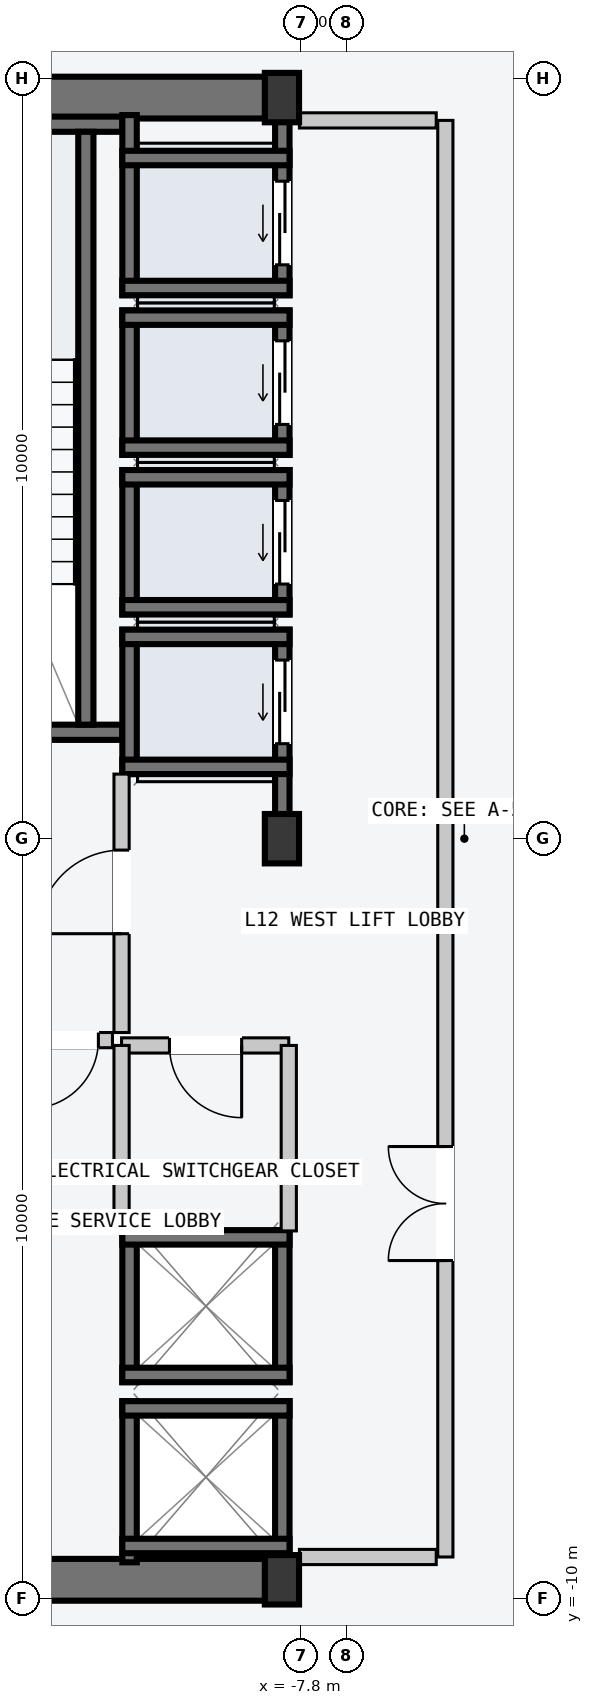
"""IFC4 building model, lengths in metres.
Left out: names, types, materials, properties, quantities, classifications, styles, units other than length and angle.
Written with IfcOpenShell. Run it as: python <this file> out.ifc"""

import sys

from ifc_helpers import new_model, si_unit, direction, frame, frame_2d, origin, origin_2d, place, context, subcontext, project, spatial, rectangle, i_section, extrude, element, fill, save


model = new_model("IFC4")
c1 = context("Model", 3, precision=1e-05, world=origin(), true_north=direction((0.0, 1.0)))
c2 = subcontext(c1, "Body", "Model", "MODEL_VIEW")
j1 = project(units=[si_unit("LENGTHUNIT", "METRE"), si_unit("PLANEANGLEUNIT", "RADIAN")], contexts=[c1])
p1 = place(None, origin())
s1 = spatial("IfcSite", under=j1, at=p1, CompositionType="ELEMENT")
p2 = place(p1, origin())
s2 = spatial("IfcBuilding", under=s1, at=p2, CompositionType="ELEMENT")
p3 = place(p2, frame((0.0, 0.0, 49.2)))
s3 = spatial("IfcBuildingStorey", under=s2, at=p3, CompositionType="ELEMENT", Elevation=49.2)
for number, where, z_axis, x_axis in (
    (1, (-14.53, -9.75, -0.2), (0.0, 0.0, 1.0), (1.0, 0.0, 0.0)),
    (2, (-14.53, 9.75, -0.2), (0.0, 0.0, 1.0), (1.0, 0.0, 0.0)),
):
    element("IfcWall", number, at=place(p3, frame(where, z_axis=z_axis, x_axis=x_axis)), inside=s3, PredefinedType="SHEAR", context=c2, shape_type="SweptSolid", body=[
        extrude(rectangle(XDim=6.46, YDim=0.55, at=frame_2d((3.23, 0.0))), origin(), (0.0, 0.0, 1.0), 3.6),
    ])
p4 = place(p3, frame((-14.25, 1.4, -0.2), z_axis=(0.0, 0.0, 1.0), x_axis=(1.0, 0.0, 0.0)))
e3 = element("IfcWall", 3, at=p4, inside=s3, PredefinedType="SOLIDWALL", context=c2, shape_type="SweptSolid", body=[
    extrude(rectangle(XDim=4.1, YDim=0.2, at=frame_2d((2.05, 0.0))), origin(), (0.0, 0.0, 1.0), 3.6),
])
p5 = place(p4, frame((1.5, 0.0, 0.2)))
e4 = element("IfcOpeningElement", 4, at=p5, cuts=e3, PredefinedType="OPENING", context=c2, shape_type="SweptSolid", body=[
    extrude(rectangle(XDim=1.12, YDim=2.18, at=frame_2d((0.56, 1.09))), frame((0.0, 0.11, 0.0), z_axis=(0.0, -1.0, 0.0), x_axis=(1.0, 0.0, 0.0)), (0.0, 0.0, 1.0), 0.22),
])
p6 = place(p3, frame((-14.25, 9.4, -0.2), z_axis=(0.0, 0.0, 1.0), x_axis=(1.0, 0.0, 0.0)))
e5 = element("IfcWall", 5, at=p6, inside=s3, PredefinedType="SOLIDWALL", context=c2, shape_type="SweptSolid", body=[
    extrude(rectangle(XDim=4.1, YDim=0.2, at=frame_2d((2.05, 0.0))), origin(), (0.0, 0.0, 1.0), 3.6),
])
p7 = place(p3, frame((-10.63, 1.5, -0.2), z_axis=(0.0, 0.0, 1.0), x_axis=(0.0, 1.0, 0.0)))
e6 = element("IfcWall", 6, at=p7, inside=s3, PredefinedType="SOLIDWALL", context=c2, shape_type="SweptSolid", body=[
    extrude(rectangle(XDim=7.8, YDim=0.2, at=frame_2d((3.9, 0.0))), origin(), (0.0, 0.0, 1.0), 3.6),
])
for number, where, z_axis, x_axis in (
    (7, (-8.05, -9.75, 0.0), (0.0, 0.0, 1.0), (1.0, 0.0, 0.0)),
    (8, (-8.05, 0.0, 0.0), (0.0, 0.0, 1.0), (1.0, 0.0, 0.0)),
    (9, (-8.05, 9.75, 0.0), (0.0, 0.0, 1.0), (1.0, 0.0, 0.0)),
):
    element("IfcColumn", number, at=place(p3, frame(where, z_axis=z_axis, x_axis=x_axis)), inside=s3, PredefinedType="COLUMN", context=c2, shape_type="SweptSolid", body=[
        extrude(i_section(OverallWidth=0.45, OverallDepth=0.65, WebThickness=0.025, FlangeThickness=0.04, at=origin_2d()), origin(), (0.0, 0.0, 1.0), 3.6),
    ])
p8 = place(p3, frame((-8.045, 0.21, -0.2), z_axis=(0.0, 0.0, 1.0), x_axis=(0.0, 1.0, 0.0)))
e10 = element("IfcWall", 10, at=p8, inside=s3, PredefinedType="SOLIDWALL", context=c2, shape_type="SweptSolid", body=[
    extrude(rectangle(XDim=2.54, YDim=0.19, at=frame_2d((1.27, 0.0))), origin(), (0.0, 0.0, 1.0), 3.6),
])
p9 = place(p8, frame((1.04, 0.0, 0.2)))
e11 = element("IfcOpeningElement", 11, at=p9, cuts=e10, PredefinedType="OPENING", context=c2, shape_type="SweptSolid", body=[
    extrude(rectangle(XDim=1.1, YDim=2.2, at=frame_2d((0.55, 1.1))), frame((0.0, 0.105, 0.0), z_axis=(0.0, -1.0, 0.0), x_axis=(1.0, 0.0, 0.0)), (0.0, 0.0, 1.0), 0.21),
])
p10 = place(p3, frame((-10.055, 0.85, -0.2), z_axis=(0.0, 0.0, 1.0), x_axis=(0.0, 1.0, 0.0)))
e12 = element("IfcWall", 12, at=p10, inside=s3, PredefinedType="SOLIDWALL", context=c2, shape_type="SweptSolid", body=[
    extrude(rectangle(XDim=1.9, YDim=0.19, at=frame_2d((0.95, 0.0))), origin(), (0.0, 0.0, 1.0), 3.6),
])
for number, where, z_axis, x_axis in (
    (13, (-10.15, 2.655, -0.2), (0.0, 0.0, 1.0), (1.0, 0.0, 0.0)),
    (14, (-10.15, 0.945, -0.2), (0.0, 0.0, 1.0), (1.0, 0.0, 0.0)),
):
    element("IfcWall", number, at=place(p3, frame(where, z_axis=z_axis, x_axis=x_axis)), inside=s3, PredefinedType="SOLIDWALL", context=c2, shape_type="SweptSolid", body=[
        extrude(rectangle(XDim=2.2, YDim=0.19, at=frame_2d((1.1, 0.0))), origin(), (0.0, 0.0, 1.0), 3.6),
    ])
p11 = place(p3, frame((-8.045, 2.95, -0.2), z_axis=(0.0, 0.0, 1.0), x_axis=(0.0, 1.0, 0.0)))
e15 = element("IfcWall", 15, at=p11, inside=s3, PredefinedType="SOLIDWALL", context=c2, shape_type="SweptSolid", body=[
    extrude(rectangle(XDim=1.9, YDim=0.19, at=frame_2d((0.95, 0.0))), origin(), (0.0, 0.0, 1.0), 3.6),
])
p12 = place(p11, frame((0.4, 0.0, 0.2)))
e16 = element("IfcOpeningElement", 16, at=p12, cuts=e15, PredefinedType="OPENING", context=c2, shape_type="SweptSolid", body=[
    extrude(rectangle(XDim=1.1, YDim=2.2, at=frame_2d((0.55, 1.1))), frame((0.0, 0.105, 0.0), z_axis=(0.0, -1.0, 0.0), x_axis=(1.0, 0.0, 0.0)), (0.0, 0.0, 1.0), 0.21),
])
p13 = place(p3, frame((-10.055, 2.95, -0.2), z_axis=(0.0, 0.0, 1.0), x_axis=(0.0, 1.0, 0.0)))
e17 = element("IfcWall", 17, at=p13, inside=s3, PredefinedType="SOLIDWALL", context=c2, shape_type="SweptSolid", body=[
    extrude(rectangle(XDim=1.9, YDim=0.19, at=frame_2d((0.95, 0.0))), origin(), (0.0, 0.0, 1.0), 3.6),
])
for number, where, z_axis, x_axis in (
    (18, (-10.15, 4.755, -0.2), (0.0, 0.0, 1.0), (1.0, 0.0, 0.0)),
    (19, (-10.15, 3.045, -0.2), (0.0, 0.0, 1.0), (1.0, 0.0, 0.0)),
):
    element("IfcWall", number, at=place(p3, frame(where, z_axis=z_axis, x_axis=x_axis)), inside=s3, PredefinedType="SOLIDWALL", context=c2, shape_type="SweptSolid", body=[
        extrude(rectangle(XDim=2.2, YDim=0.19, at=frame_2d((1.1, 0.0))), origin(), (0.0, 0.0, 1.0), 3.6),
    ])
p14 = place(p3, frame((-8.045, 5.05, -0.2), z_axis=(0.0, 0.0, 1.0), x_axis=(0.0, 1.0, 0.0)))
e20 = element("IfcWall", 20, at=p14, inside=s3, PredefinedType="SOLIDWALL", context=c2, shape_type="SweptSolid", body=[
    extrude(rectangle(XDim=1.9, YDim=0.19, at=frame_2d((0.95, 0.0))), origin(), (0.0, 0.0, 1.0), 3.6),
])
p15 = place(p14, frame((0.4, 0.0, 0.2)))
e21 = element("IfcOpeningElement", 21, at=p15, cuts=e20, PredefinedType="OPENING", context=c2, shape_type="SweptSolid", body=[
    extrude(rectangle(XDim=1.1, YDim=2.2, at=frame_2d((0.55, 1.1))), frame((0.0, 0.105, 0.0), z_axis=(0.0, -1.0, 0.0), x_axis=(1.0, 0.0, 0.0)), (0.0, 0.0, 1.0), 0.21),
])
p16 = place(p3, frame((-10.055, 5.05, -0.2), z_axis=(0.0, 0.0, 1.0), x_axis=(0.0, 1.0, 0.0)))
e22 = element("IfcWall", 22, at=p16, inside=s3, PredefinedType="SOLIDWALL", context=c2, shape_type="SweptSolid", body=[
    extrude(rectangle(XDim=1.9, YDim=0.19, at=frame_2d((0.95, 0.0))), origin(), (0.0, 0.0, 1.0), 3.6),
])
for number, where, z_axis, x_axis in (
    (23, (-10.15, 6.855, -0.2), (0.0, 0.0, 1.0), (1.0, 0.0, 0.0)),
    (24, (-10.15, 5.145, -0.2), (0.0, 0.0, 1.0), (1.0, 0.0, 0.0)),
):
    element("IfcWall", number, at=place(p3, frame(where, z_axis=z_axis, x_axis=x_axis)), inside=s3, PredefinedType="SOLIDWALL", context=c2, shape_type="SweptSolid", body=[
        extrude(rectangle(XDim=2.2, YDim=0.19, at=frame_2d((1.1, 0.0))), origin(), (0.0, 0.0, 1.0), 3.6),
    ])
p17 = place(p3, frame((-8.045, 7.15, -0.2), z_axis=(0.0, 0.0, 1.0), x_axis=(0.0, 1.0, 0.0)))
e25 = element("IfcWall", 25, at=p17, inside=s3, PredefinedType="SOLIDWALL", context=c2, shape_type="SweptSolid", body=[
    extrude(rectangle(XDim=2.37, YDim=0.19, at=frame_2d((1.185, 0.0))), origin(), (0.0, 0.0, 1.0), 3.6),
])
p18 = place(p17, frame((0.4, 0.0, 0.2)))
e26 = element("IfcOpeningElement", 26, at=p18, cuts=e25, PredefinedType="OPENING", context=c2, shape_type="SweptSolid", body=[
    extrude(rectangle(XDim=1.1, YDim=2.2, at=frame_2d((0.55, 1.1))), frame((0.0, 0.105, 0.0), z_axis=(0.0, -1.0, 0.0), x_axis=(1.0, 0.0, 0.0)), (0.0, 0.0, 1.0), 0.21),
])
p19 = place(p3, frame((-10.055, 7.15, -0.2), z_axis=(0.0, 0.0, 1.0), x_axis=(0.0, 1.0, 0.0)))
e27 = element("IfcWall", 27, at=p19, inside=s3, PredefinedType="SOLIDWALL", context=c2, shape_type="SweptSolid", body=[
    extrude(rectangle(XDim=2.37, YDim=0.19, at=frame_2d((1.185, 0.0))), origin(), (0.0, 0.0, 1.0), 3.6),
])
for number, where, z_axis, x_axis in (
    (28, (-10.15, 8.955, -0.2), (0.0, 0.0, 1.0), (1.0, 0.0, 0.0)),
    (29, (-10.15, 7.245, -0.2), (0.0, 0.0, 1.0), (1.0, 0.0, 0.0)),
):
    element("IfcWall", number, at=place(p3, frame(where, z_axis=z_axis, x_axis=x_axis)), inside=s3, PredefinedType="SOLIDWALL", context=c2, shape_type="SweptSolid", body=[
        extrude(rectangle(XDim=2.2, YDim=0.19, at=frame_2d((1.1, 0.0))), origin(), (0.0, 0.0, 1.0), 3.6),
    ])
for number, where, z_axis, x_axis in (
    (30, (-8.045, -9.52, -0.2), (0.0, 0.0, 1.0), (0.0, 1.0, 0.0)),
    (31, (-10.055, -9.52, -0.2), (0.0, 0.0, 1.0), (0.0, 1.0, 0.0)),
):
    element("IfcWall", number, at=place(p3, frame(where, z_axis=z_axis, x_axis=x_axis)), inside=s3, PredefinedType="SOLIDWALL", context=c2, shape_type="SweptSolid", body=[
        extrude(rectangle(XDim=2.12, YDim=0.19, at=frame_2d((1.06, 0.0))), origin(), (0.0, 0.0, 1.0), 3.6),
    ])
for number, where, z_axis, x_axis in (
    (32, (-10.15, -7.495, -0.2), (0.0, 0.0, 1.0), (1.0, 0.0, 0.0)),
    (33, (-10.15, -9.305, -0.2), (0.0, 0.0, 1.0), (1.0, 0.0, 0.0)),
):
    element("IfcWall", number, at=place(p3, frame(where, z_axis=z_axis, x_axis=x_axis)), inside=s3, PredefinedType="SOLIDWALL", context=c2, shape_type="SweptSolid", body=[
        extrude(rectangle(XDim=2.2, YDim=0.19, at=frame_2d((1.1, 0.0))), origin(), (0.0, 0.0, 1.0), 3.6),
    ])
for number, where, z_axis, x_axis in (
    (34, (-8.045, -7.15, -0.2), (0.0, 0.0, 1.0), (0.0, 1.0, 0.0)),
    (35, (-10.055, -7.15, -0.2), (0.0, 0.0, 1.0), (0.0, 1.0, 0.0)),
):
    element("IfcWall", number, at=place(p3, frame(where, z_axis=z_axis, x_axis=x_axis)), inside=s3, PredefinedType="SOLIDWALL", context=c2, shape_type="SweptSolid", body=[
        extrude(rectangle(XDim=2.0, YDim=0.19, at=frame_2d((1.0, 0.0))), origin(), (0.0, 0.0, 1.0), 3.6),
    ])
for number, where, z_axis, x_axis in (
    (36, (-10.15, -5.245, -0.2), (0.0, 0.0, 1.0), (1.0, 0.0, 0.0)),
    (37, (-10.15, -7.055, -0.2), (0.0, 0.0, 1.0), (1.0, 0.0, 0.0)),
):
    element("IfcWall", number, at=place(p3, frame(where, z_axis=z_axis, x_axis=x_axis)), inside=s3, PredefinedType="SOLIDWALL", context=c2, shape_type="SweptSolid", body=[
        extrude(rectangle(XDim=2.2, YDim=0.19, at=frame_2d((1.1, 0.0))), origin(), (0.0, 0.0, 1.0), 3.6),
    ])
p20 = place(p3, frame((-5.9, -9.45, 0.0), z_axis=(0.0, 0.0, 1.0), x_axis=(0.0, 1.0, 0.0)))
e38 = element("IfcWall", 38, at=p20, inside=s3, PredefinedType="PARTITIONING", context=c2, shape_type="SweptSolid", body=[
    extrude(rectangle(XDim=18.9, YDim=0.2, at=frame_2d((9.45, 0.0))), origin(), (0.0, 0.0, 1.0), 3.4),
])
p21 = place(p20, frame((3.9, 0.0, 0.0)))
e39 = element("IfcOpeningElement", 39, at=p21, cuts=e38, PredefinedType="OPENING", context=c2, shape_type="SweptSolid", body=[
    extrude(rectangle(XDim=1.5, YDim=2.2, at=frame_2d((0.75, 1.1))), frame((0.0, 0.11, 0.0), z_axis=(0.0, -1.0, 0.0), x_axis=(1.0, 0.0, 0.0)), (0.0, 0.0, 1.0), 0.22),
])
for number, where, z_axis, x_axis in (
    (40, (-6.02, -9.45, 0.0), (0.0, 0.0, 1.0), (-1.0, 0.0, 0.0)),
    (41, (-6.02, 9.45, 0.0), (0.0, 0.0, 1.0), (-1.0, 0.0, 0.0)),
):
    element("IfcWall", number, at=place(p3, frame(where, z_axis=z_axis, x_axis=x_axis)), inside=s3, PredefinedType="PARTITIONING", context=c2, shape_type="SweptSolid", body=[
        extrude(rectangle(XDim=1.8, YDim=0.2, at=frame_2d((0.9, 0.0))), origin(), (0.0, 0.0, 1.0), 3.4),
    ])
p22 = place(p3, frame((-10.16, -2.55, 0.0), z_axis=(0.0, 0.0, 1.0), x_axis=(0.0, 1.0, 0.0)))
e42 = element("IfcWall", 42, at=p22, inside=s3, PredefinedType="PARTITIONING", context=c2, shape_type="SweptSolid", body=[
    extrude(rectangle(XDim=3.4, YDim=0.2, at=frame_2d((1.7, 0.0))), origin(), (0.0, 0.0, 1.0), 3.4),
])
p23 = place(p22, frame((1.3, 0.0, 0.0)))
e43 = element("IfcOpeningElement", 43, at=p23, cuts=e42, PredefinedType="OPENING", context=c2, shape_type="SweptSolid", body=[
    extrude(rectangle(XDim=1.1, YDim=2.15, at=frame_2d((0.55, 1.075))), frame((0.0, 0.11, 0.0), z_axis=(0.0, -1.0, 0.0), x_axis=(1.0, 0.0, 0.0)), (0.0, 0.0, 1.0), 0.22),
])
p24 = place(p3, frame((-10.28, -2.65, 0.0), z_axis=(0.0, 0.0, 1.0), x_axis=(-1.0, 0.0, 0.0)))
e44 = element("IfcWall", 44, at=p24, inside=s3, PredefinedType="PARTITIONING", context=c2, shape_type="SweptSolid", body=[
    extrude(rectangle(XDim=1.27, YDim=0.2, at=frame_2d((0.635, 0.0))), origin(), (0.0, 0.0, 1.0), 3.4),
])
p25 = place(p24, frame((0.185, 0.0, 0.0)))
e45 = element("IfcOpeningElement", 45, at=p25, cuts=e44, PredefinedType="OPENING", context=c2, shape_type="SweptSolid", body=[
    extrude(rectangle(XDim=0.9, YDim=2.15, at=frame_2d((0.45, 1.075))), frame((0.0, 0.11, 0.0), z_axis=(0.0, -1.0, 0.0), x_axis=(1.0, 0.0, 0.0)), (0.0, 0.0, 1.0), 0.22),
])
p26 = place(p3, frame((-7.96, -2.72, 0.0), z_axis=(0.0, 0.0, 1.0), x_axis=(-1.0, 0.0, 0.0)))
e46 = element("IfcWall", 46, at=p26, inside=s3, PredefinedType="PARTITIONING", context=c2, shape_type="SweptSolid", body=[
    extrude(rectangle(XDim=2.2, YDim=0.2, at=frame_2d((1.1, 0.0))), origin(), (0.0, 0.0, 1.0), 3.4),
])
p27 = place(p26, frame((0.62, 0.0, 0.0)))
e47 = element("IfcOpeningElement", 47, at=p27, cuts=e46, PredefinedType="OPENING", context=c2, shape_type="SweptSolid", body=[
    extrude(rectangle(XDim=0.95, YDim=2.1, at=frame_2d((0.475, 1.05))), frame((0.0, 0.11, 0.0), z_axis=(0.0, -1.0, 0.0), x_axis=(1.0, 0.0, 0.0)), (0.0, 0.0, 1.0), 0.22),
])
for number, where, z_axis, x_axis in (
    (48, (-7.96, -5.16, 0.0), (0.0, 0.0, 1.0), (0.0, 1.0, 0.0)),
    (49, (-10.16, -5.16, 0.0), (0.0, 0.0, 1.0), (0.0, 1.0, 0.0)),
):
    element("IfcWall", number, at=place(p3, frame(where, z_axis=z_axis, x_axis=x_axis)), inside=s3, PredefinedType="PARTITIONING", context=c2, shape_type="SweptSolid", body=[
        extrude(rectangle(XDim=2.44, YDim=0.2, at=frame_2d((1.22, 0.0))), origin(), (0.0, 0.0, 1.0), 3.4),
    ])
p28 = place(p9, origin())
e50 = element("IfcDoor", 50, at=p28, inside=s3, OperationType="SLIDING_TO_LEFT", PredefinedType="DOOR", context=c2, shape_type="SweptSolid", body=[
    extrude(rectangle(XDim=1.1, YDim=2.2, at=frame_2d((0.55, 1.1))), frame((0.0, 0.025, 0.0), z_axis=(0.0, -1.0, 0.0), x_axis=(1.0, 0.0, 0.0)), (0.0, 0.0, 1.0), 0.05),
])
fill(e11, e50)
p29 = place(p12, origin())
e51 = element("IfcDoor", 51, at=p29, inside=s3, OperationType="SLIDING_TO_LEFT", PredefinedType="DOOR", context=c2, shape_type="SweptSolid", body=[
    extrude(rectangle(XDim=1.1, YDim=2.2, at=frame_2d((0.55, 1.1))), frame((0.0, 0.025, 0.0), z_axis=(0.0, -1.0, 0.0), x_axis=(1.0, 0.0, 0.0)), (0.0, 0.0, 1.0), 0.05),
])
fill(e16, e51)
p30 = place(p15, origin())
e52 = element("IfcDoor", 52, at=p30, inside=s3, OperationType="SLIDING_TO_LEFT", PredefinedType="DOOR", context=c2, shape_type="SweptSolid", body=[
    extrude(rectangle(XDim=1.1, YDim=2.2, at=frame_2d((0.55, 1.1))), frame((0.0, 0.025, 0.0), z_axis=(0.0, -1.0, 0.0), x_axis=(1.0, 0.0, 0.0)), (0.0, 0.0, 1.0), 0.05),
])
fill(e21, e52)
p31 = place(p18, origin())
e53 = element("IfcDoor", 53, at=p31, inside=s3, OperationType="SLIDING_TO_LEFT", PredefinedType="DOOR", context=c2, shape_type="SweptSolid", body=[
    extrude(rectangle(XDim=1.1, YDim=2.2, at=frame_2d((0.55, 1.1))), frame((0.0, 0.025, 0.0), z_axis=(0.0, -1.0, 0.0), x_axis=(1.0, 0.0, 0.0)), (0.0, 0.0, 1.0), 0.05),
])
fill(e26, e53)
p32 = place(p21, origin())
e54 = element("IfcDoor", 54, at=p32, inside=s3, OperationType="DOUBLE_DOOR_SINGLE_SWING", PredefinedType="DOOR", context=c2, shape_type="SweptSolid", body=[
    extrude(rectangle(XDim=1.5, YDim=2.2, at=frame_2d((0.75, 1.1))), frame((0.0, 0.025, 0.0), z_axis=(0.0, -1.0, 0.0), x_axis=(1.0, 0.0, 0.0)), (0.0, 0.0, 1.0), 0.05),
])
fill(e39, e54)
p33 = place(p23, origin())
e55 = element("IfcDoor", 55, at=p33, inside=s3, OperationType="SINGLE_SWING_LEFT", PredefinedType="DOOR", context=c2, shape_type="SweptSolid", body=[
    extrude(rectangle(XDim=1.1, YDim=2.15, at=frame_2d((0.55, 1.075))), frame((0.0, 0.025, 0.0), z_axis=(0.0, -1.0, 0.0), x_axis=(1.0, 0.0, 0.0)), (0.0, 0.0, 1.0), 0.05),
])
fill(e43, e55)
p34 = place(p25, origin())
e56 = element("IfcDoor", 56, at=p34, inside=s3, OperationType="SINGLE_SWING_RIGHT", PredefinedType="DOOR", context=c2, shape_type="SweptSolid", body=[
    extrude(rectangle(XDim=0.9, YDim=2.15, at=frame_2d((0.45, 1.075))), frame((0.0, 0.025, 0.0), z_axis=(0.0, -1.0, 0.0), x_axis=(1.0, 0.0, 0.0)), (0.0, 0.0, 1.0), 0.05),
])
fill(e45, e56)
p35 = place(p27, origin())
e57 = element("IfcDoor", 57, at=p35, inside=s3, OperationType="SINGLE_SWING_LEFT", PredefinedType="DOOR", context=c2, shape_type="SweptSolid", body=[
    extrude(rectangle(XDim=0.95, YDim=2.1, at=frame_2d((0.475, 1.05))), frame((0.0, 0.025, 0.0), z_axis=(0.0, -1.0, 0.0), x_axis=(1.0, 0.0, 0.0)), (0.0, 0.0, 1.0), 0.05),
])
fill(e47, e57)
save(model, sys.argv[1])
